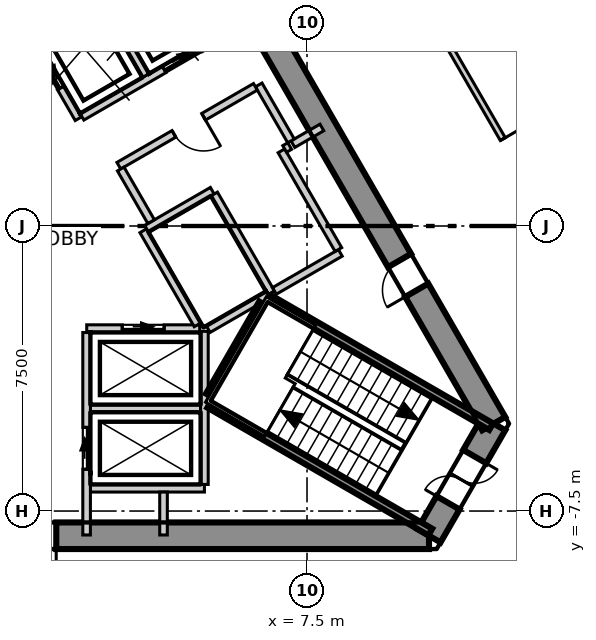
"""IFC4 building model, lengths in metres.
Left out: names, types, materials, properties, quantities, classifications, styles, units other than length and angle.
Written with IfcOpenShell. Run it as: python <this file> out.ifc"""

import sys

from ifc_helpers import new_model, si_unit, direction, frame, frame_2d, origin, place, context, subcontext, project, spatial, polyline, rectangle, outline, extrude, element, fill, save


model = new_model("IFC4")
c1 = context("Model", 3, precision=1e-05, world=origin(), true_north=direction((0.0, 1.0)))
c2 = subcontext(c1, "Body", "Model", "MODEL_VIEW")
j1 = project(units=[si_unit("LENGTHUNIT", "METRE"), si_unit("PLANEANGLEUNIT", "RADIAN")], contexts=[c1])
p1 = place(None, origin())
s1 = spatial("IfcSite", under=j1, at=p1, CompositionType="ELEMENT")
p2 = place(p1, origin())
s2 = spatial("IfcBuilding", under=s1, at=p2, CompositionType="ELEMENT")
p3 = place(p2, frame((0.0, 0.0, 191.3)))
s3 = spatial("IfcBuildingStorey", under=s2, at=p3, CompositionType="ELEMENT", Elevation=191.3)
p4 = place(p3, frame((-10.71, -8.15, -0.3), z_axis=(0.0, 0.0, 1.0), x_axis=(1.0, 0.0, 0.0)))
e1 = element("IfcWall", 1, at=p4, inside=s3, PredefinedType="SHEAR", context=c2, shape_type="SweptSolid", body=[
    extrude(outline(polyline([(-0.202, -0.35), (1.782, -0.35), (3.766, -0.35), (5.75, -0.35), (7.734, -0.35), (9.718, -0.35), (11.702, -0.35), (13.686, -0.35), (15.67, -0.35), (17.654, -0.35), (19.638, -0.35), (21.622, -0.35), (21.218, 0.35), (19.307, 0.35), (17.397, 0.35), (15.486, 0.35), (13.576, 0.35), (11.665, 0.35), (9.755, 0.35), (7.844, 0.35), (5.934, 0.35), (4.023, 0.35), (2.113, 0.35), (0.202, 0.35), (-0.202, -0.35)])), origin(), (0.0, 0.0, 1.0), 4.0),
])
p5 = place(p4, frame((9.81, 0.0, 0.3)))
e2 = element("IfcOpeningElement", 2, at=p5, cuts=e1, PredefinedType="OPENING", context=c2, shape_type="SweptSolid", body=[
    extrude(rectangle(XDim=1.8, YDim=2.1, at=frame_2d((0.9, 1.05))), frame((0.0, 0.36, 0.0), z_axis=(0.0, -1.0, 0.0), x_axis=(1.0, 0.0, 0.0)), (0.0, 0.0, 1.0), 0.72),
])
p6 = place(p4, frame((4.09, 0.0, 0.3)))
e3 = element("IfcOpeningElement", 3, at=p6, cuts=e1, PredefinedType="OPENING", context=c2, shape_type="SweptSolid", body=[
    extrude(rectangle(XDim=1.0, YDim=2.1, at=frame_2d((0.5, 1.05))), frame((0.0, 0.36, 0.0), z_axis=(0.0, -1.0, 0.0), x_axis=(1.0, 0.0, 0.0)), (0.0, 0.0, 1.0), 0.72),
])
p7 = place(p3, frame((10.71, -8.15, -0.3), z_axis=(0.0, 0.0, 1.0), x_axis=(0.49999337185, 0.866029230515, 0.0)))
e4 = element("IfcWall", 4, at=p7, inside=s3, PredefinedType="SHEAR", context=c2, shape_type="SweptSolid", body=[
    extrude(outline(polyline([(-0.202, -0.35), (1.703, -0.35), (3.608, -0.35), (3.204, 0.35), (1.703, 0.35), (0.202, 0.35), (-0.202, -0.35)])), origin(), (0.0, 0.0, 1.0), 4.0),
])
p8 = place(p7, frame((1.003, 0.0, 0.3)))
e5 = element("IfcOpeningElement", 5, at=p8, cuts=e4, PredefinedType="OPENING", context=c2, shape_type="SweptSolid", body=[
    extrude(rectangle(XDim=1.4, YDim=2.1, at=frame_2d((0.7, 1.05))), frame((0.0, 0.36, 0.0), z_axis=(0.0, -1.0, 0.0), x_axis=(1.0, 0.0, 0.0)), (0.0, 0.0, 1.0), 0.72),
])
p9 = place(p3, frame((12.413, -5.2, -0.3), z_axis=(0.0, 0.0, 1.0), x_axis=(-0.500011533395, 0.866018744874, 0.0)))
e6 = element("IfcWall", 6, at=p9, inside=s3, PredefinedType="SHEAR", context=c2, shape_type="SweptSolid", body=[
    extrude(outline(polyline([(-0.202, -0.35), (1.782, -0.35), (3.766, -0.35), (5.75, -0.35), (7.734, -0.35), (9.718, -0.35), (11.702, -0.35), (13.686, -0.35), (15.67, -0.35), (17.654, -0.35), (19.638, -0.35), (21.622, -0.35), (21.218, 0.35), (19.307, 0.35), (17.397, 0.35), (15.486, 0.35), (13.576, 0.35), (11.665, 0.35), (9.755, 0.35), (7.844, 0.35), (5.934, 0.35), (4.023, 0.35), (2.113, 0.35), (0.202, 0.35), (-0.202, -0.35)])), origin(), (0.0, 0.0, 1.0), 4.0),
])
p10 = place(p9, frame((4.055, 0.0, 0.3)))
e7 = element("IfcOpeningElement", 7, at=p10, cuts=e6, PredefinedType="OPENING", context=c2, shape_type="SweptSolid", body=[
    extrude(rectangle(XDim=0.9, YDim=2.1, at=frame_2d((0.45, 1.05))), frame((0.0, 0.36, 0.0), z_axis=(0.0, -1.0, 0.0), x_axis=(1.0, 0.0, 0.0)), (0.0, 0.0, 1.0), 0.72),
])
p11 = place(p9, frame((16.465, 0.0, 0.3)))
e8 = element("IfcOpeningElement", 8, at=p11, cuts=e6, PredefinedType="OPENING", context=c2, shape_type="SweptSolid", body=[
    extrude(rectangle(XDim=0.9, YDim=2.1, at=frame_2d((0.45, 1.05))), frame((0.0, 0.36, 0.0), z_axis=(0.0, -1.0, 0.0), x_axis=(1.0, 0.0, 0.0)), (0.0, 0.0, 1.0), 0.72),
])
p12 = place(p3, frame((29.165, -13.525, 0.0), z_axis=(0.0, 0.0, 1.0), x_axis=(-0.500008941164, 0.86602024154, 0.0)))
e9 = element("IfcWall", 9, at=p12, inside=s3, PredefinedType="ELEMENTEDWALL", context=c2, shape_type="SweptSolid", body=[
    extrude(rectangle(XDim=52.571, YDim=0.2, at=frame_2d((26.286, 0.0))), origin(), (0.0, 0.0, 1.0), 3.7),
])
p13 = place(p12, frame((2.327, 0.0, 0.9)))
e10 = element("IfcOpeningElement", 10, at=p13, cuts=e9, PredefinedType="OPENING", context=c2, shape_type="SweptSolid", body=[
    extrude(rectangle(XDim=4.2, YDim=2.5, at=frame_2d((2.1, 1.25))), frame((0.0, 0.11, 0.0), z_axis=(0.0, -1.0, 0.0), x_axis=(1.0, 0.0, 0.0)), (0.0, 0.0, 1.0), 0.22),
])
p14 = place(p12, frame((8.575, 0.0, 0.9)))
e11 = element("IfcOpeningElement", 11, at=p14, cuts=e9, PredefinedType="OPENING", context=c2, shape_type="SweptSolid", body=[
    extrude(rectangle(XDim=4.2, YDim=2.5, at=frame_2d((2.1, 1.25))), frame((0.0, 0.11, 0.0), z_axis=(0.0, -1.0, 0.0), x_axis=(1.0, 0.0, 0.0)), (0.0, 0.0, 1.0), 0.22),
])
p15 = place(p12, frame((14.823, 0.0, 0.9)))
e12 = element("IfcOpeningElement", 12, at=p15, cuts=e9, PredefinedType="OPENING", context=c2, shape_type="SweptSolid", body=[
    extrude(rectangle(XDim=4.2, YDim=2.5, at=frame_2d((2.1, 1.25))), frame((0.0, 0.11, 0.0), z_axis=(0.0, -1.0, 0.0), x_axis=(1.0, 0.0, 0.0)), (0.0, 0.0, 1.0), 0.22),
])
p16 = place(p12, frame((21.072, 0.0, 0.9)))
e13 = element("IfcOpeningElement", 13, at=p16, cuts=e9, PredefinedType="OPENING", context=c2, shape_type="SweptSolid", body=[
    extrude(rectangle(XDim=4.2, YDim=2.5, at=frame_2d((2.1, 1.25))), frame((0.0, 0.11, 0.0), z_axis=(0.0, -1.0, 0.0), x_axis=(1.0, 0.0, 0.0)), (0.0, 0.0, 1.0), 0.22),
])
p17 = place(p12, frame((27.32, 0.0, 0.9)))
e14 = element("IfcOpeningElement", 14, at=p17, cuts=e9, PredefinedType="OPENING", context=c2, shape_type="SweptSolid", body=[
    extrude(rectangle(XDim=4.2, YDim=2.5, at=frame_2d((2.1, 1.25))), frame((0.0, 0.11, 0.0), z_axis=(0.0, -1.0, 0.0), x_axis=(1.0, 0.0, 0.0)), (0.0, 0.0, 1.0), 0.22),
])
p18 = place(p12, frame((33.568, 0.0, 0.9)))
e15 = element("IfcOpeningElement", 15, at=p18, cuts=e9, PredefinedType="OPENING", context=c2, shape_type="SweptSolid", body=[
    extrude(rectangle(XDim=4.2, YDim=2.5, at=frame_2d((2.1, 1.25))), frame((0.0, 0.11, 0.0), z_axis=(0.0, -1.0, 0.0), x_axis=(1.0, 0.0, 0.0)), (0.0, 0.0, 1.0), 0.22),
])
p19 = place(p12, frame((39.816, 0.0, 0.9)))
e16 = element("IfcOpeningElement", 16, at=p19, cuts=e9, PredefinedType="OPENING", context=c2, shape_type="SweptSolid", body=[
    extrude(rectangle(XDim=4.2, YDim=2.5, at=frame_2d((2.1, 1.25))), frame((0.0, 0.11, 0.0), z_axis=(0.0, -1.0, 0.0), x_axis=(1.0, 0.0, 0.0)), (0.0, 0.0, 1.0), 0.22),
])
p20 = place(p12, frame((46.064, 0.0, 0.9)))
e17 = element("IfcOpeningElement", 17, at=p20, cuts=e9, PredefinedType="OPENING", context=c2, shape_type="SweptSolid", body=[
    extrude(rectangle(XDim=4.2, YDim=2.5, at=frame_2d((2.1, 1.25))), frame((0.0, 0.11, 0.0), z_axis=(0.0, -1.0, 0.0), x_axis=(1.0, 0.0, 0.0)), (0.0, 0.0, 1.0), 0.22),
])
p21 = place(p3, frame((0.075, 24.07, 0.0), z_axis=(0.0, 0.0, 1.0), x_axis=(0.49999939571, -0.866025752671, 0.0)))
e18 = element("IfcWall", 18, at=p21, inside=s3, PredefinedType="PARTITIONING", context=c2, shape_type="SweptSolid", body=[
    extrude(rectangle(XDim=41.614, YDim=0.15, at=frame_2d((20.807, 0.0))), origin(), (0.0, 0.0, 1.0), 3.7),
])
p22 = place(p21, frame((37.015, 0.0, 0.0)))
e19 = element("IfcOpeningElement", 19, at=p22, cuts=e18, PredefinedType="OPENING", context=c2, shape_type="SweptSolid", body=[
    extrude(rectangle(XDim=1.1, YDim=2.1, at=frame_2d((0.55, 1.05))), frame((0.0, 0.085, 0.0), z_axis=(0.0, -1.0, 0.0), x_axis=(1.0, 0.0, 0.0)), (0.0, 0.0, 1.0), 0.17),
])
p23 = place(p21, frame((25.154, 0.0, 0.0)))
e20 = element("IfcOpeningElement", 20, at=p23, cuts=e18, PredefinedType="OPENING", context=c2, shape_type="SweptSolid", body=[
    extrude(rectangle(XDim=1.0, YDim=2.1, at=frame_2d((0.5, 1.05))), frame((0.0, 0.085, 0.0), z_axis=(0.0, -1.0, 0.0), x_axis=(1.0, 0.0, 0.0)), (0.0, 0.0, 1.0), 0.17),
])
p24 = place(p21, frame((31.454, 0.0, 0.0)))
e21 = element("IfcOpeningElement", 21, at=p24, cuts=e18, PredefinedType="OPENING", context=c2, shape_type="SweptSolid", body=[
    extrude(rectangle(XDim=0.9, YDim=2.1, at=frame_2d((0.45, 1.05))), frame((0.0, 0.085, 0.0), z_axis=(0.0, -1.0, 0.0), x_axis=(1.0, 0.0, 0.0)), (0.0, 0.0, 1.0), 0.17),
])
p25 = place(p21, frame((17.157, 0.0, 0.0)))
e22 = element("IfcOpeningElement", 22, at=p25, cuts=e18, PredefinedType="OPENING", context=c2, shape_type="SweptSolid", body=[
    extrude(rectangle(XDim=1.0, YDim=2.1, at=frame_2d((0.5, 1.05))), frame((0.0, 0.085, 0.0), z_axis=(0.0, -1.0, 0.0), x_axis=(1.0, 0.0, 0.0)), (0.0, 0.0, 1.0), 0.17),
])
p26 = place(p21, frame((6.609, 0.0, 0.0)))
e23 = element("IfcOpeningElement", 23, at=p26, cuts=e18, PredefinedType="OPENING", context=c2, shape_type="SweptSolid", body=[
    extrude(rectangle(XDim=1.1, YDim=2.1, at=frame_2d((0.55, 1.05))), frame((0.0, 0.085, 0.0), z_axis=(0.0, -1.0, 0.0), x_axis=(1.0, 0.0, 0.0)), (0.0, 0.0, 1.0), 0.17),
])
p27 = place(p3, frame((1.8, -4.8, 0.0), z_axis=(0.0, 0.0, 1.0), x_axis=(1.0, 0.0, 0.0)))
e24 = element("IfcWall", 24, at=p27, inside=s3, PredefinedType="SOLIDWALL", context=c2, shape_type="SweptSolid", body=[
    extrude(rectangle(XDim=2.9, YDim=0.2, at=frame_2d((1.45, 0.0))), origin(), (0.0, 0.0, 1.0), 3.7),
])
p28 = place(p3, frame((1.8, -6.9, 0.0), z_axis=(0.0, 0.0, 1.0), x_axis=(1.0, 0.0, 0.0)))
e25 = element("IfcWall", 25, at=p28, inside=s3, PredefinedType="SOLIDWALL", context=c2, shape_type="SweptSolid", body=[
    extrude(rectangle(XDim=3.0, YDim=0.2, at=frame_2d((1.5, 0.0))), origin(), (0.0, 0.0, 1.0), 3.7),
])
p29 = place(p3, frame((1.703, -2.7, 0.0), z_axis=(0.0, 0.0, 1.0), x_axis=(1.0, 0.0, 0.0)))
e26 = element("IfcWall", 26, at=p29, inside=s3, PredefinedType="SOLIDWALL", context=c2, shape_type="SweptSolid", body=[
    extrude(rectangle(XDim=2.973, YDim=0.2, at=frame_2d((1.487, 0.0))), origin(), (0.0, 0.0, 1.0), 3.7),
])
p30 = place(p29, frame((0.936, 0.0, 0.0)))
e27 = element("IfcOpeningElement", 27, at=p30, cuts=e26, PredefinedType="OPENING", context=c2, shape_type="SweptSolid", body=[
    extrude(rectangle(XDim=1.1, YDim=2.1, at=frame_2d((0.55, 1.05))), frame((0.0, 0.11, 0.0), z_axis=(0.0, -1.0, 0.0), x_axis=(1.0, 0.0, 0.0)), (0.0, 0.0, 1.0), 0.22),
])
p31 = place(p3, frame((0.0, 5.4, 0.0), z_axis=(0.0, 0.0, 1.0), x_axis=(0.500103862429, -0.865965430478, 0.0)))
e28 = element("IfcWall", 28, at=p31, inside=s3, PredefinedType="SOLIDWALL", context=c2, shape_type="SweptSolid", body=[
    extrude(rectangle(XDim=2.973, YDim=0.2, at=frame_2d((1.487, 0.0))), origin(), (0.0, 0.0, 1.0), 3.7),
])
p32 = place(p31, frame((0.937, 0.0, 0.0)))
e29 = element("IfcOpeningElement", 29, at=p32, cuts=e28, PredefinedType="OPENING", context=c2, shape_type="SweptSolid", body=[
    extrude(rectangle(XDim=1.1, YDim=2.1, at=frame_2d((0.55, 1.05))), frame((0.0, 0.11, 0.0), z_axis=(0.0, -1.0, 0.0), x_axis=(1.0, 0.0, 0.0)), (0.0, 0.0, 1.0), 0.22),
])
p33 = place(p3, frame((3.19, -0.125, 0.0), z_axis=(0.0, 0.0, 1.0), x_axis=(0.499988658015, -0.866031951983, 0.0)))
e30 = element("IfcWall", 30, at=p33, inside=s3, PredefinedType="SOLIDWALL", context=c2, shape_type="SweptSolid", body=[
    extrude(rectangle(XDim=2.858, YDim=0.2, at=frame_2d((1.429, 0.0))), origin(), (0.0, 0.0, 1.0), 3.7),
])
p34 = place(p3, frame((1.578, 2.874, 0.0), z_axis=(0.0, 0.0, 1.0), x_axis=(0.866045911672, 0.499964477614, 0.0)))
e31 = element("IfcWall", 31, at=p34, inside=s3, PredefinedType="SOLIDWALL", context=c2, shape_type="SweptSolid", body=[
    extrude(rectangle(XDim=5.327, YDim=0.2, at=frame_2d((2.663, 0.0))), origin(), (0.0, 0.0, 1.0), 3.7),
])
p35 = place(p34, frame((2.496, 0.0, 0.0)))
e32 = element("IfcOpeningElement", 32, at=p35, cuts=e31, PredefinedType="OPENING", context=c2, shape_type="SweptSolid", body=[
    extrude(rectangle(XDim=1.1, YDim=2.1, at=frame_2d((0.55, 1.05))), frame((0.0, 0.11, 0.0), z_axis=(0.0, -1.0, 0.0), x_axis=(1.0, 0.0, 0.0)), (0.0, 0.0, 1.0), 0.22),
])
p36 = place(p3, frame((1.7, -8.13, 0.0), z_axis=(0.0, 0.0, 1.0), x_axis=(0.0, 1.0, 0.0)))
e33 = element("IfcWall", 33, at=p36, inside=s3, PredefinedType="SOLIDWALL", context=c2, shape_type="SweptSolid", body=[
    extrude(rectangle(XDim=5.327, YDim=0.2, at=frame_2d((2.664, 0.0))), origin(), (0.0, 0.0, 1.0), 3.7),
])
p37 = place(p36, frame((1.73, 0.0, 0.0)))
e34 = element("IfcOpeningElement", 34, at=p37, cuts=e33, PredefinedType="OPENING", context=c2, shape_type="SweptSolid", body=[
    extrude(rectangle(XDim=1.1, YDim=2.1, at=frame_2d((0.55, 1.05))), frame((0.0, 0.11, 0.0), z_axis=(0.0, -1.0, 0.0), x_axis=(1.0, 0.0, 0.0)), (0.0, 0.0, 1.0), 0.22),
])
p38 = place(p3, frame((4.8, -6.8, 0.0), z_axis=(0.0, 0.0, 1.0), x_axis=(0.0, 1.0, 0.0)))
e35 = element("IfcWall", 35, at=p38, inside=s3, PredefinedType="SOLIDWALL", context=c2, shape_type="SweptSolid", body=[
    extrude(rectangle(XDim=4.029, YDim=0.2, at=frame_2d((2.015, 0.0))), origin(), (0.0, 0.0, 1.0), 3.7),
])
p39 = place(p3, frame((3.278, -0.071, 0.0), z_axis=(0.0, 0.0, 1.0), x_axis=(0.865855657918, 0.500293893279, 0.0)))
e36 = element("IfcWall", 36, at=p39, inside=s3, PredefinedType="SOLIDWALL", context=c2, shape_type="SweptSolid", body=[
    extrude(rectangle(XDim=1.997, YDim=0.2, at=frame_2d((0.999, 0.0))), origin(), (0.0, 0.0, 1.0), 3.7),
])
p40 = place(p3, frame((7.129, 2.153, 0.0), z_axis=(0.0, 0.0, 1.0), x_axis=(0.866083962871, 0.499898558967, 0.0)))
e37 = element("IfcWall", 37, at=p40, inside=s3, PredefinedType="SOLIDWALL", context=c2, shape_type="SweptSolid", body=[
    extrude(rectangle(XDim=0.88, YDim=0.2, at=frame_2d((0.44, 0.0))), origin(), (0.0, 0.0, 1.0), 3.7),
])
p41 = place(p3, frame((1.807, 6.47, 0.0), z_axis=(0.0, 0.0, 1.0), x_axis=(0.50012328804, -0.865954211699, 0.0)))
e38 = element("IfcWall", 38, at=p41, inside=s3, PredefinedType="SOLIDWALL", context=c2, shape_type="SweptSolid", body=[
    extrude(rectangle(XDim=2.9, YDim=0.2, at=frame_2d((1.45, 0.0))), origin(), (0.0, 0.0, 1.0), 3.7),
])
p42 = place(p3, frame((5.057, 0.841, 0.0), z_axis=(0.0, 0.0, 1.0), x_axis=(0.499990139034, -0.866031096941, 0.0)))
e39 = element("IfcWall", 39, at=p42, inside=s3, PredefinedType="SOLIDWALL", context=c2, shape_type="SweptSolid", body=[
    extrude(rectangle(XDim=3.0, YDim=0.2, at=frame_2d((1.5, 0.0))), origin(), (0.0, 0.0, 1.0), 3.7),
])
p43 = place(p3, frame((4.9, -2.714, 0.0), z_axis=(0.0, 0.0, 1.0), x_axis=(0.865846928409, 0.500309001083, 0.0)))
e40 = element("IfcWall", 40, at=p43, inside=s3, PredefinedType="SOLIDWALL", context=c2, shape_type="SweptSolid", body=[
    extrude(rectangle(XDim=1.813, YDim=0.2, at=frame_2d((0.907, 0.0))), origin(), (0.0, 0.0, 1.0), 3.7),
])
p44 = place(p3, frame((6.229, 3.712, 0.0), z_axis=(0.0, 0.0, 1.0), x_axis=(0.499875724984, -0.86609714211, 0.0)))
e41 = element("IfcWall", 41, at=p44, inside=s3, PredefinedType="SOLIDWALL", context=c2, shape_type="SweptSolid", body=[
    extrude(rectangle(XDim=1.701, YDim=0.2, at=frame_2d((0.85, 0.0))), origin(), (0.0, 0.0, 1.0), 3.7),
])
p45 = place(p3, frame((2.548, 1.587, 0.0), z_axis=(0.0, 0.0, 1.0), x_axis=(0.866004344652, 0.500036473714, 0.0)))
e42 = element("IfcWall", 42, at=p45, inside=s3, PredefinedType="SOLIDWALL", context=c2, shape_type="SweptSolid", body=[
    extrude(rectangle(XDim=4.15, YDim=0.2, at=frame_2d((2.075, 0.0))), origin(), (0.0, 0.0, 1.0), 3.7),
])
p46 = place(p45, frame((1.675, 0.0, 0.0)))
e43 = element("IfcOpeningElement", 43, at=p46, cuts=e42, PredefinedType="OPENING", context=c2, shape_type="SweptSolid", body=[
    extrude(rectangle(XDim=0.9, YDim=2.1, at=frame_2d((0.45, 1.05))), frame((0.0, 0.11, 0.0), z_axis=(0.0, -1.0, 0.0), x_axis=(1.0, 0.0, 0.0)), (0.0, 0.0, 1.0), 0.22),
])
p47 = place(p3, frame((2.598, 1.5, 0.0), z_axis=(0.0, 0.0, 1.0), x_axis=(0.499929347863, -0.866066190972, 0.0)))
e44 = element("IfcWall", 44, at=p47, inside=s3, PredefinedType="SOLIDWALL", context=c2, shape_type="SweptSolid", body=[
    extrude(rectangle(XDim=1.6, YDim=0.2, at=frame_2d((0.8, 0.0))), origin(), (0.0, 0.0, 1.0), 3.7),
])
p48 = place(p3, frame((3.724, -8.13, 0.0), z_axis=(0.0, 0.0, 1.0), x_axis=(0.0, 1.0, 0.0)))
e45 = element("IfcWall", 45, at=p48, inside=s3, PredefinedType="SOLIDWALL", context=c2, shape_type="SweptSolid", body=[
    extrude(rectangle(XDim=1.13, YDim=0.2, at=frame_2d((0.565, 0.0))), origin(), (0.0, 0.0, 1.0), 3.7),
])
p49 = place(p3, frame((6.642, -1.708, 0.0), z_axis=(0.0, 0.0, 1.0), x_axis=(0.866043441391, 0.499968756647, 0.0)))
e46 = element("IfcWall", 46, at=p49, inside=s3, PredefinedType="SOLIDWALL", context=c2, shape_type="SweptSolid", body=[
    extrude(rectangle(XDim=2.002, YDim=0.2, at=frame_2d((1.001, 0.0))), origin(), (0.0, 0.0, 1.0), 3.7),
])
p50 = place(p3, frame((6.826, 1.978, 0.0), z_axis=(0.0, 0.0, 1.0), x_axis=(0.499990139034, -0.866031096941, 0.0)))
e47 = element("IfcWall", 47, at=p50, inside=s3, PredefinedType="SOLIDWALL", context=c2, shape_type="SweptSolid", body=[
    extrude(rectangle(XDim=3.0, YDim=0.2, at=frame_2d((1.5, 0.0))), origin(), (0.0, 0.0, 1.0), 3.7),
])
p51 = place(p3, frame((6.912, 2.028, 0.0), z_axis=(0.0, 0.0, 1.0), x_axis=(0.866559367082, 0.499074005857, 0.0)))
e48 = element("IfcWall", 48, at=p51, inside=s3, PredefinedType="SOLIDWALL", context=c2, shape_type="SweptSolid", body=[
    extrude(rectangle(XDim=0.152, YDim=0.2, at=frame_2d((0.076, 0.0))), origin(), (0.0, 0.0, 1.0), 3.7),
])
p52 = place(p3, frame((4.929, -4.693, 0.0), z_axis=(0.0, 0.0, 1.0), x_axis=(0.865983344943, -0.500072840975, 0.0)))
e49 = element("IfcWall", 49, at=p52, inside=s3, PredefinedType="SOLIDWALL", context=c2, shape_type="SweptSolid", body=[
    extrude(rectangle(XDim=6.715, YDim=0.2, at=frame_2d((3.357, 0.0))), origin(), (0.0, 0.0, 1.0), 3.7),
])
p53 = place(p3, frame((4.929, -4.462, 0.0), z_axis=(0.0, 0.0, 1.0), x_axis=(0.500200581029, 0.865909567298, 0.0)))
e50 = element("IfcWall", 50, at=p53, inside=s3, PredefinedType="SOLIDWALL", context=c2, shape_type="SweptSolid", body=[
    extrude(rectangle(XDim=2.799, YDim=0.2, at=frame_2d((1.399, 0.0))), origin(), (0.0, 0.0, 1.0), 3.7),
])
p54 = place(p3, frame((6.529, -1.922, 0.0), z_axis=(0.0, 0.0, 1.0), x_axis=(0.866046323291, -0.499963764601, 0.0)))
e51 = element("IfcWall", 51, at=p54, inside=s3, PredefinedType="SOLIDWALL", context=c2, shape_type="SweptSolid", body=[
    extrude(rectangle(XDim=6.714, YDim=0.2, at=frame_2d((3.357, 0.0))), origin(), (0.0, 0.0, 1.0), 3.7),
])
p55 = place(p30, origin())
e52 = element("IfcDoor", 52, at=p55, inside=s3, OperationType="SLIDING_TO_LEFT", PredefinedType="DOOR", context=c2, shape_type="SweptSolid", body=[
    extrude(rectangle(XDim=1.1, YDim=2.1, at=frame_2d((0.55, 1.05))), frame((0.0, 0.025, 0.0), z_axis=(0.0, -1.0, 0.0), x_axis=(1.0, 0.0, 0.0)), (0.0, 0.0, 1.0), 0.05),
])
fill(e27, e52)
p56 = place(p37, origin())
e53 = element("IfcDoor", 53, at=p56, inside=s3, OperationType="SLIDING_TO_LEFT", PredefinedType="DOOR", context=c2, shape_type="SweptSolid", body=[
    extrude(rectangle(XDim=1.1, YDim=2.1, at=frame_2d((0.55, 1.05))), frame((0.0, 0.025, 0.0), z_axis=(0.0, -1.0, 0.0), x_axis=(1.0, 0.0, 0.0)), (0.0, 0.0, 1.0), 0.05),
])
fill(e34, e53)
p57 = place(p32, origin())
e54 = element("IfcDoor", 54, at=p57, inside=s3, OperationType="SLIDING_TO_LEFT", PredefinedType="DOOR", context=c2, shape_type="SweptSolid", body=[
    extrude(rectangle(XDim=1.1, YDim=2.1, at=frame_2d((0.55, 1.05))), frame((0.0, 0.025, 0.0), z_axis=(0.0, -1.0, 0.0), x_axis=(1.0, 0.0, 0.0)), (0.0, 0.0, 1.0), 0.05),
])
fill(e29, e54)
p58 = place(p35, origin())
e55 = element("IfcDoor", 55, at=p58, inside=s3, OperationType="SLIDING_TO_LEFT", PredefinedType="DOOR", context=c2, shape_type="SweptSolid", body=[
    extrude(rectangle(XDim=1.1, YDim=2.1, at=frame_2d((0.55, 1.05))), frame((0.0, 0.025, 0.0), z_axis=(0.0, -1.0, 0.0), x_axis=(1.0, 0.0, 0.0)), (0.0, 0.0, 1.0), 0.05),
])
fill(e32, e55)
p59 = place(p23, origin())
e56 = element("IfcDoor", 56, at=p59, inside=s3, OperationType="SINGLE_SWING_RIGHT", PredefinedType="DOOR", context=c2, shape_type="SweptSolid", body=[
    extrude(rectangle(XDim=1.0, YDim=2.1, at=frame_2d((0.5, 1.05))), frame((0.0, 0.025, 0.0), z_axis=(0.0, -1.0, 0.0), x_axis=(1.0, 0.0, 0.0)), (0.0, 0.0, 1.0), 0.05),
])
fill(e20, e56)
p60 = place(p5, origin())
e57 = element("IfcDoor", 57, at=p60, inside=s3, OperationType="DOUBLE_DOOR_SINGLE_SWING", PredefinedType="DOOR", context=c2, shape_type="SweptSolid", body=[
    extrude(rectangle(XDim=1.8, YDim=2.1, at=frame_2d((0.9, 1.05))), frame((0.0, 0.025, 0.0), z_axis=(0.0, -1.0, 0.0), x_axis=(1.0, 0.0, 0.0)), (0.0, 0.0, 1.0), 0.05),
])
fill(e2, e57)
p61 = place(p8, origin())
e58 = element("IfcDoor", 58, at=p61, inside=s3, OperationType="DOUBLE_DOOR_SINGLE_SWING", PredefinedType="DOOR", context=c2, shape_type="SweptSolid", body=[
    extrude(rectangle(XDim=1.4, YDim=2.1, at=frame_2d((0.7, 1.05))), frame((0.0, 0.025, 0.0), z_axis=(0.0, -1.0, 0.0), x_axis=(1.0, 0.0, 0.0)), (0.0, 0.0, 1.0), 0.05),
])
fill(e5, e58)
p62 = place(p10, origin())
e59 = element("IfcDoor", 59, at=p62, inside=s3, OperationType="SINGLE_SWING_RIGHT", PredefinedType="DOOR", context=c2, shape_type="SweptSolid", body=[
    extrude(rectangle(XDim=0.9, YDim=2.1, at=frame_2d((0.45, 1.05))), frame((0.0, 0.025, 0.0), z_axis=(0.0, -1.0, 0.0), x_axis=(1.0, 0.0, 0.0)), (0.0, 0.0, 1.0), 0.05),
])
fill(e7, e59)
p63 = place(p46, origin())
e60 = element("IfcDoor", 60, at=p63, inside=s3, OperationType="SINGLE_SWING_RIGHT", PredefinedType="DOOR", context=c2, shape_type="SweptSolid", body=[
    extrude(rectangle(XDim=0.9, YDim=2.1, at=frame_2d((0.45, 1.05))), frame((0.0, 0.025, 0.0), z_axis=(0.0, -1.0, 0.0), x_axis=(1.0, 0.0, 0.0)), (0.0, 0.0, 1.0), 0.05),
])
fill(e43, e60)
save(model, sys.argv[1])
